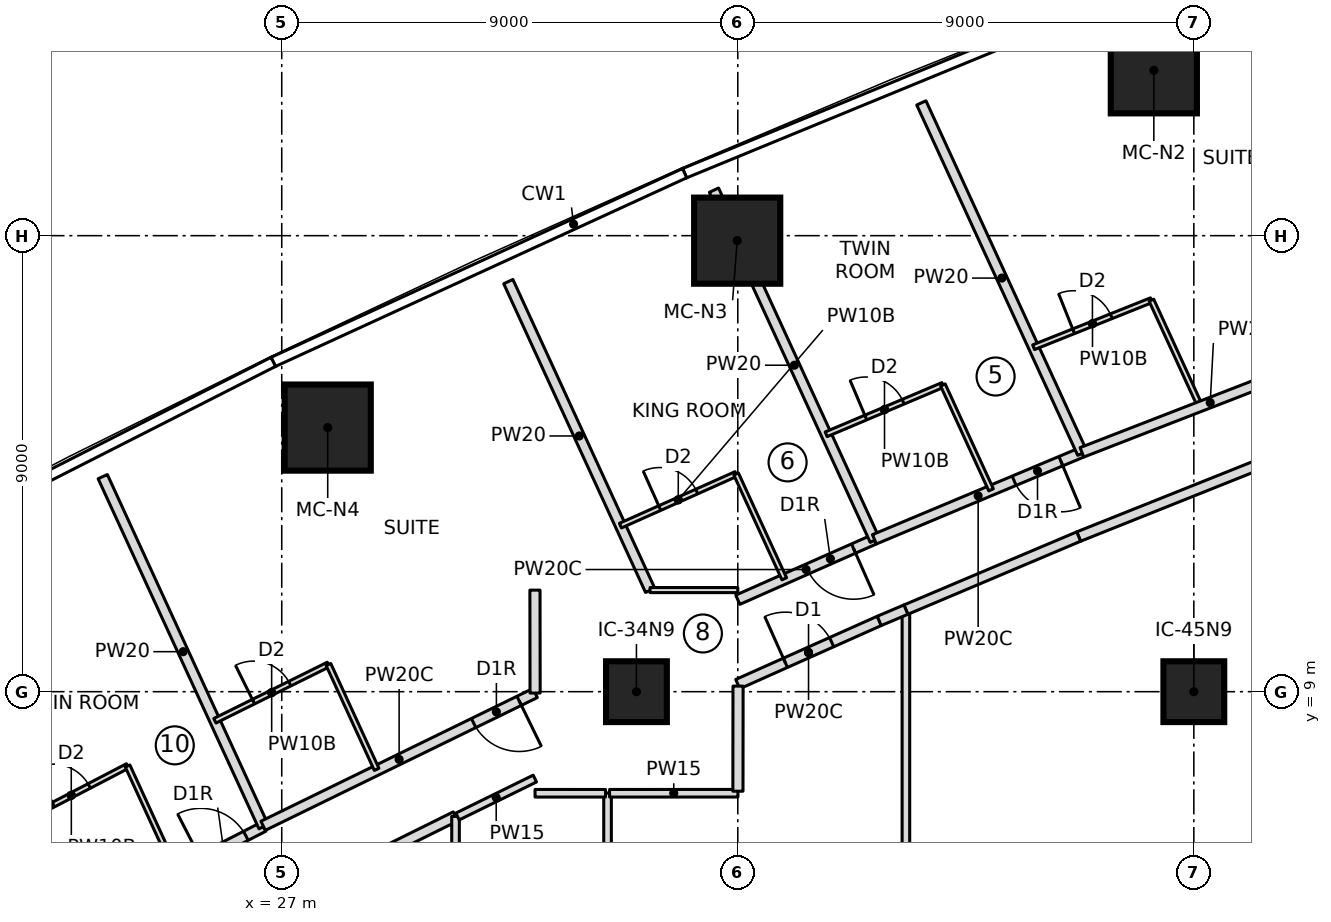
"""IFC4 building model, lengths in metres.
Left out: names, types, materials, properties, quantities, classifications, styles, units other than length and angle.
Written with IfcOpenShell. Run it as: python <this file> out.ifc"""

import sys

from ifc_helpers import new_model, si_unit, direction, frame, frame_2d, origin, origin_2d, place, context, subcontext, project, spatial, rectangle, extrude, element, fill, save


model = new_model("IFC4")
c1 = context("Model", 3, precision=1e-05, world=origin(), true_north=direction((0.0, 1.0)))
c2 = subcontext(c1, "Body", "Model", "MODEL_VIEW")
j1 = project(units=[si_unit("LENGTHUNIT", "METRE"), si_unit("PLANEANGLEUNIT", "RADIAN")], contexts=[c1])
p1 = place(None, origin())
s1 = spatial("IfcSite", under=j1, at=p1, CompositionType="ELEMENT")
p2 = place(p1, origin())
s2 = spatial("IfcBuilding", under=s1, at=p2, CompositionType="ELEMENT")
p3 = place(p2, frame((0.0, 0.0, 84.9)))
s3 = spatial("IfcBuildingStorey", under=s2, at=p3, CompositionType="ELEMENT", Elevation=84.9)
for number, where, z_axis, x_axis in (
    (1, (44.211, 21.264, 0.0), (0.0, 0.0, 1.0), (1.0, 0.0, 0.0)),
    (2, (35.988, 17.902, 0.0), (0.0, 0.0, 1.0), (1.0, 0.0, 0.0)),
    (3, (27.907, 14.212, 0.0), (0.0, 0.0, 1.0), (1.0, 0.0, 0.0)),
):
    element("IfcColumn", number, at=place(p3, frame(where, z_axis=z_axis, x_axis=x_axis)), inside=s3, PredefinedType="COLUMN", context=c2, shape_type="SweptSolid", body=[
        extrude(rectangle(XDim=1.7, YDim=1.7, at=origin_2d()), origin(), (0.0, 0.0, 1.0), 3.55),
    ])
for number, where, z_axis, x_axis in (
    (4, (34.0, 9.0, 0.0), (0.0, 0.0, 1.0), (1.0, 0.0, 0.0)),
    (5, (45.0, 9.0, 0.0), (0.0, 0.0, 1.0), (1.0, 0.0, 0.0)),
):
    element("IfcColumn", number, at=place(p3, frame(where, z_axis=z_axis, x_axis=x_axis)), inside=s3, PredefinedType="COLUMN", context=c2, shape_type="SweptSolid", body=[
        extrude(rectangle(XDim=1.2, YDim=1.2, at=origin_2d()), origin(), (0.0, 0.0, 1.0), 3.55),
    ])
p4 = place(p3, frame((22.699, 4.284, 0.0), z_axis=(0.0, 0.0, 1.0), x_axis=(-0.417413534969, 0.908716644959, 0.0)))
e6 = element("IfcWall", 6, at=p4, inside=s3, PredefinedType="PARTITIONING", context=c2, shape_type="SweptSolid", body=[
    extrude(rectangle(XDim=7.609, YDim=0.2, at=frame_2d((3.805, 0.0))), origin(), (0.0, 0.0, 1.0), 3.25),
])
p5 = place(p3, frame((22.69, 4.302, 0.0), z_axis=(0.0, 0.0, 1.0), x_axis=(0.889236075961, 0.457448577667, 0.0)))
e7 = element("IfcWall", 7, at=p5, inside=s3, PredefinedType="PARTITIONING", context=c2, shape_type="SweptSolid", body=[
    extrude(rectangle(XDim=4.443, YDim=0.2, at=frame_2d((2.222, 0.0))), origin(), (0.0, 0.0, 1.0), 3.25),
])
p6 = place(p5, frame((3.05, 0.0, 0.0)))
e8 = element("IfcOpeningElement", 8, at=p6, cuts=e7, PredefinedType="OPENING", context=c2, shape_type="SweptSolid", body=[
    extrude(rectangle(XDim=1.0, YDim=2.1, at=frame_2d((0.5, 1.05))), frame((0.0, 0.11, 0.0), z_axis=(0.0, -1.0, 0.0), x_axis=(1.0, 0.0, 0.0)), (0.0, 0.0, 1.0), 0.22),
])
p7 = place(p3, frame((21.738, 6.377, 0.0), z_axis=(0.0, 0.0, 1.0), x_axis=(0.886911586599, 0.461939214135, 0.0)))
e9 = element("IfcWall", 9, at=p7, inside=s3, PredefinedType="PARTITIONING", context=c2, shape_type="SweptSolid", body=[
    extrude(rectangle(XDim=2.503, YDim=0.1, at=frame_2d((1.251, 0.0))), origin(), (0.0, 0.0, 1.0), 3.25),
])
p8 = place(p7, frame((0.85, 0.0, 0.0)))
e10 = element("IfcOpeningElement", 10, at=p8, cuts=e9, PredefinedType="OPENING", context=c2, shape_type="SweptSolid", body=[
    extrude(rectangle(XDim=0.8, YDim=2.1, at=frame_2d((0.4, 1.05))), frame((0.0, 0.06, 0.0), z_axis=(0.0, -1.0, 0.0), x_axis=(1.0, 0.0, 0.0)), (0.0, 0.0, 1.0), 0.12),
])
p9 = place(p3, frame((23.958, 7.533, 0.0), z_axis=(0.0, 0.0, 1.0), x_axis=(0.417454762401, -0.908697706253, 0.0)))
e11 = element("IfcWall", 11, at=p9, inside=s3, PredefinedType="PARTITIONING", context=c2, shape_type="SweptSolid", body=[
    extrude(rectangle(XDim=2.28, YDim=0.1, at=frame_2d((1.14, 0.0))), origin(), (0.0, 0.0, 1.0), 3.25),
])
p10 = place(p3, frame((26.641, 6.335, 0.0), z_axis=(0.0, 0.0, 1.0), x_axis=(-0.417455028008, 0.908697584233, 0.0)))
e12 = element("IfcWall", 12, at=p10, inside=s3, PredefinedType="PARTITIONING", context=c2, shape_type="SweptSolid", body=[
    extrude(rectangle(XDim=7.603, YDim=0.2, at=frame_2d((3.802, 0.0))), origin(), (0.0, 0.0, 1.0), 3.25),
])
p11 = place(p3, frame((32.0, 8.973, 0.0), z_axis=(0.0, 0.0, 1.0), x_axis=(-0.898654091263, -0.438657980956, 0.0)))
e13 = element("IfcWall", 13, at=p11, inside=s3, PredefinedType="PARTITIONING", context=c2, shape_type="SweptSolid", body=[
    extrude(rectangle(XDim=5.972, YDim=0.2, at=frame_2d((2.986, 0.0))), origin(), (0.0, 0.0, 1.0), 3.25),
])
p12 = place(p11, frame((0.35, 0.0, 0.0)))
e14 = element("IfcOpeningElement", 14, at=p12, cuts=e13, PredefinedType="OPENING", context=c2, shape_type="SweptSolid", body=[
    extrude(rectangle(XDim=1.0, YDim=2.1, at=frame_2d((0.5, 1.05))), frame((0.0, 0.11, 0.0), z_axis=(0.0, -1.0, 0.0), x_axis=(1.0, 0.0, 0.0)), (0.0, 0.0, 1.0), 0.22),
])
p13 = place(p3, frame((25.681, 8.426, 0.0), z_axis=(0.0, 0.0, 1.0), x_axis=(0.895944857815, 0.444165297784, 0.0)))
e15 = element("IfcWall", 15, at=p13, inside=s3, PredefinedType="PARTITIONING", context=c2, shape_type="SweptSolid", body=[
    extrude(rectangle(XDim=2.501, YDim=0.1, at=frame_2d((1.25, 0.0))), origin(), (0.0, 0.0, 1.0), 3.25),
])
p14 = place(p13, frame((0.85, 0.0, 0.0)))
e16 = element("IfcOpeningElement", 16, at=p14, cuts=e15, PredefinedType="OPENING", context=c2, shape_type="SweptSolid", body=[
    extrude(rectangle(XDim=0.8, YDim=2.1, at=frame_2d((0.4, 1.05))), frame((0.0, 0.06, 0.0), z_axis=(0.0, -1.0, 0.0), x_axis=(1.0, 0.0, 0.0)), (0.0, 0.0, 1.0), 0.12),
])
p15 = place(p3, frame((27.922, 9.537, 0.0), z_axis=(0.0, 0.0, 1.0), x_axis=(0.417433204355, -0.908707609686, 0.0)))
e17 = element("IfcWall", 17, at=p15, inside=s3, PredefinedType="PARTITIONING", context=c2, shape_type="SweptSolid", body=[
    extrude(rectangle(XDim=2.278, YDim=0.1, at=frame_2d((1.139, 0.0))), origin(), (0.0, 0.0, 1.0), 3.25),
])
p16 = place(p3, frame((34.271, 11.0, 0.0), z_axis=(0.0, 0.0, 1.0), x_axis=(-0.417420546123, 0.908713424394, 0.0)))
e18 = element("IfcWall", 18, at=p16, inside=s3, PredefinedType="PARTITIONING", context=c2, shape_type="SweptSolid", body=[
    extrude(rectangle(XDim=6.706, YDim=0.2, at=frame_2d((3.353, 0.0))), origin(), (0.0, 0.0, 1.0), 3.25),
])
p17 = place(p3, frame((38.696, 12.007, 0.0), z_axis=(0.0, 0.0, 1.0), x_axis=(-0.914578343518, -0.404408770389, 0.0)))
e19 = element("IfcWall", 19, at=p17, inside=s3, PredefinedType="PARTITIONING", context=c2, shape_type="SweptSolid", body=[
    extrude(rectangle(XDim=2.948, YDim=0.2, at=frame_2d((1.474, 0.0))), origin(), (0.0, 0.0, 1.0), 3.25),
])
p18 = place(p17, frame((0.45, 0.0, 0.0)))
e20 = element("IfcOpeningElement", 20, at=p18, cuts=e19, PredefinedType="OPENING", context=c2, shape_type="SweptSolid", body=[
    extrude(rectangle(XDim=1.0, YDim=2.1, at=frame_2d((0.5, 1.05))), frame((0.0, 0.11, 0.0), z_axis=(0.0, -1.0, 0.0), x_axis=(1.0, 0.0, 0.0)), (0.0, 0.0, 1.0), 0.22),
])
p19 = place(p3, frame((33.684, 12.277, 0.0), z_axis=(0.0, 0.0, 1.0), x_axis=(0.913016449487, 0.407922741417, 0.0)))
e21 = element("IfcWall", 21, at=p19, inside=s3, PredefinedType="PARTITIONING", context=c2, shape_type="SweptSolid", body=[
    extrude(rectangle(XDim=2.5, YDim=0.1, at=frame_2d((1.25, 0.0))), origin(), (0.0, 0.0, 1.0), 3.25),
])
p20 = place(p19, frame((0.85, 0.0, 0.0)))
e22 = element("IfcOpeningElement", 22, at=p20, cuts=e21, PredefinedType="OPENING", context=c2, shape_type="SweptSolid", body=[
    extrude(rectangle(XDim=0.8, YDim=2.1, at=frame_2d((0.4, 1.05))), frame((0.0, 0.06, 0.0), z_axis=(0.0, -1.0, 0.0), x_axis=(1.0, 0.0, 0.0)), (0.0, 0.0, 1.0), 0.12),
])
p21 = place(p3, frame((35.967, 13.297, 0.0), z_axis=(0.0, 0.0, 1.0), x_axis=(0.417378147321, -0.908732899228, 0.0)))
e23 = element("IfcWall", 23, at=p21, inside=s3, PredefinedType="PARTITIONING", context=c2, shape_type="SweptSolid", body=[
    extrude(rectangle(XDim=2.277, YDim=0.1, at=frame_2d((1.139, 0.0))), origin(), (0.0, 0.0, 1.0), 3.25),
])
p22 = place(p3, frame((38.704, 11.989, 0.0), z_axis=(0.0, 0.0, 1.0), x_axis=(-0.417416334044, 0.908715359215, 0.0)))
e24 = element("IfcWall", 24, at=p22, inside=s3, PredefinedType="PARTITIONING", context=c2, shape_type="SweptSolid", body=[
    extrude(rectangle(XDim=7.604, YDim=0.2, at=frame_2d((3.802, 0.0))), origin(), (0.0, 0.0, 1.0), 3.25),
])
p23 = place(p3, frame((42.791, 13.724, 0.0), z_axis=(0.0, 0.0, 1.0), x_axis=(-0.922230433067, -0.386640696675, 0.0)))
e25 = element("IfcWall", 25, at=p23, inside=s3, PredefinedType="PARTITIONING", context=c2, shape_type="SweptSolid", body=[
    extrude(rectangle(XDim=4.44, YDim=0.2, at=frame_2d((2.22, 0.0))), origin(), (0.0, 0.0, 1.0), 3.25),
])
p24 = place(p23, frame((0.45, 0.0, 0.0)))
e26 = element("IfcOpeningElement", 26, at=p24, cuts=e25, PredefinedType="OPENING", context=c2, shape_type="SweptSolid", body=[
    extrude(rectangle(XDim=1.0, YDim=2.1, at=frame_2d((0.5, 1.05))), frame((0.0, 0.11, 0.0), z_axis=(0.0, -1.0, 0.0), x_axis=(1.0, 0.0, 0.0)), (0.0, 0.0, 1.0), 0.22),
])
p25 = place(p3, frame((37.744, 14.08, 0.0), z_axis=(0.0, 0.0, 1.0), x_axis=(0.921042675983, 0.38946166566, 0.0)))
e27 = element("IfcWall", 27, at=p25, inside=s3, PredefinedType="PARTITIONING", context=c2, shape_type="SweptSolid", body=[
    extrude(rectangle(XDim=2.501, YDim=0.1, at=frame_2d((1.25, 0.0))), origin(), (0.0, 0.0, 1.0), 3.25),
])
p26 = place(p25, frame((0.85, 0.0, 0.0)))
e28 = element("IfcOpeningElement", 28, at=p26, cuts=e27, PredefinedType="OPENING", context=c2, shape_type="SweptSolid", body=[
    extrude(rectangle(XDim=0.8, YDim=2.1, at=frame_2d((0.4, 1.05))), frame((0.0, 0.06, 0.0), z_axis=(0.0, -1.0, 0.0), x_axis=(1.0, 0.0, 0.0)), (0.0, 0.0, 1.0), 0.12),
])
p27 = place(p3, frame((40.048, 15.054, 0.0), z_axis=(0.0, 0.0, 1.0), x_axis=(0.417433204355, -0.908707609686, 0.0)))
e29 = element("IfcWall", 29, at=p27, inside=s3, PredefinedType="PARTITIONING", context=c2, shape_type="SweptSolid", body=[
    extrude(rectangle(XDim=2.278, YDim=0.1, at=frame_2d((1.139, 0.0))), origin(), (0.0, 0.0, 1.0), 3.25),
])
p28 = place(p3, frame((42.799, 13.705, 0.0), z_axis=(0.0, 0.0, 1.0), x_axis=(-0.417427858403, 0.908710065438, 0.0)))
e30 = element("IfcWall", 30, at=p28, inside=s3, PredefinedType="PARTITIONING", context=c2, shape_type="SweptSolid", body=[
    extrude(rectangle(XDim=7.61, YDim=0.2, at=frame_2d((3.805, 0.0))), origin(), (0.0, 0.0, 1.0), 3.25),
])
p29 = place(p3, frame((41.838, 15.798, 0.0), z_axis=(0.0, 0.0, 1.0), x_axis=(0.928638024739, 0.370987087388, 0.0)))
e31 = element("IfcWall", 31, at=p29, inside=s3, PredefinedType="PARTITIONING", context=c2, shape_type="SweptSolid", body=[
    extrude(rectangle(XDim=2.503, YDim=0.1, at=frame_2d((1.252, 0.0))), origin(), (0.0, 0.0, 1.0), 3.25),
])
p30 = place(p29, frame((0.85, 0.0, 0.0)))
e32 = element("IfcOpeningElement", 32, at=p30, cuts=e31, PredefinedType="OPENING", context=c2, shape_type="SweptSolid", body=[
    extrude(rectangle(XDim=0.8, YDim=2.1, at=frame_2d((0.4, 1.05))), frame((0.0, 0.06, 0.0), z_axis=(0.0, -1.0, 0.0), x_axis=(1.0, 0.0, 0.0)), (0.0, 0.0, 1.0), 0.12),
])
p31 = place(p3, frame((44.163, 16.727, 0.0), z_axis=(0.0, 0.0, 1.0), x_axis=(0.417373525971, -0.908735021785, 0.0)))
e33 = element("IfcWall", 33, at=p31, inside=s3, PredefinedType="PARTITIONING", context=c2, shape_type="SweptSolid", body=[
    extrude(rectangle(XDim=2.28, YDim=0.1, at=frame_2d((1.14, 0.0))), origin(), (0.0, 0.0, 1.0), 3.25),
])
p32 = place(p3, frame((27.196, 4.936, 0.0), z_axis=(0.0, 0.0, 1.0), x_axis=(0.895964304417, 0.44412606905, 0.0)))
e34 = element("IfcWall", 34, at=p32, inside=s3, PredefinedType="PARTITIONING", context=c2, shape_type="SweptSolid", body=[
    extrude(rectangle(XDim=3.609, YDim=0.2, at=frame_2d((1.804, 0.0))), origin(), (0.0, 0.0, 1.0), 3.25),
])
p33 = place(p3, frame((30.43, -6.539, 0.0), z_axis=(0.0, 0.0, 1.0), x_axis=(0.0, 1.0, 0.0)))
e35 = element("IfcWall", 35, at=p33, inside=s3, PredefinedType="PARTITIONING", context=c2, shape_type="SweptSolid", body=[
    extrude(rectangle(XDim=13.077, YDim=0.15, at=frame_2d((6.539, 0.0))), origin(), (0.0, 0.0, 1.0), 3.25),
])
p34 = place(p3, frame((33.43, -7.0, 0.0), z_axis=(0.0, 0.0, 1.0), x_axis=(0.0, 1.0, 0.0)))
e36 = element("IfcWall", 36, at=p34, inside=s3, PredefinedType="PARTITIONING", context=c2, shape_type="SweptSolid", body=[
    extrude(rectangle(XDim=14.0, YDim=0.15, at=frame_2d((7.0, 0.0))), origin(), (0.0, 0.0, 1.0), 3.25),
])
p35 = place(p3, frame((36.0, 9.15, 0.0), z_axis=(0.0, 0.0, 1.0), x_axis=(0.913029587861, 0.407893333716, 0.0)))
e37 = element("IfcWall", 37, at=p35, inside=s3, PredefinedType="PARTITIONING", context=c2, shape_type="SweptSolid", body=[
    extrude(rectangle(XDim=3.058, YDim=0.2, at=frame_2d((1.529, 0.0))), origin(), (0.0, 0.0, 1.0), 3.25),
])
p36 = place(p35, frame((1.029, 0.0, 0.0)))
e38 = element("IfcOpeningElement", 38, at=p36, cuts=e37, PredefinedType="OPENING", context=c2, shape_type="SweptSolid", body=[
    extrude(rectangle(XDim=1.0, YDim=2.1, at=frame_2d((0.5, 1.05))), frame((0.0, 0.11, 0.0), z_axis=(0.0, -1.0, 0.0), x_axis=(1.0, 0.0, 0.0)), (0.0, 0.0, 1.0), 0.22),
])
p37 = place(p3, frame((39.318, -10.619, 0.0), z_axis=(0.0, 0.0, 1.0), x_axis=(0.0, 1.0, 0.0)))
e39 = element("IfcWall", 39, at=p37, inside=s3, PredefinedType="PARTITIONING", context=c2, shape_type="SweptSolid", body=[
    extrude(rectangle(XDim=21.239, YDim=0.15, at=frame_2d((10.619, 0.0))), origin(), (0.0, 0.0, 1.0), 3.25),
])
p38 = place(p3, frame((42.728, 12.062, 0.0), z_axis=(0.0, 0.0, 1.0), x_axis=(0.928638161177, 0.370986745864, 0.0)))
e40 = element("IfcWall", 40, at=p38, inside=s3, PredefinedType="PARTITIONING", context=c2, shape_type="SweptSolid", body=[
    extrude(rectangle(XDim=4.273, YDim=0.2, at=frame_2d((2.136, 0.0))), origin(), (0.0, 0.0, 1.0), 3.25),
])
p39 = place(p3, frame((39.318, 10.619, 0.0), z_axis=(0.0, 0.0, 1.0), x_axis=(0.92101730011, 0.389521671923, 0.0)))
e41 = element("IfcWall", 41, at=p39, inside=s3, PredefinedType="PARTITIONING", context=c2, shape_type="SweptSolid", body=[
    extrude(rectangle(XDim=3.702, YDim=0.2, at=frame_2d((1.851, 0.0))), origin(), (0.0, 0.0, 1.0), 3.25),
])
p40 = place(p3, frame((36.0, 11.005, 0.0), z_axis=(0.0, 0.0, 1.0), x_axis=(-1.0, 0.0, 0.0)))
e42 = element("IfcWall", 42, at=p40, inside=s3, PredefinedType="PARTITIONING", context=c2, shape_type="SweptSolid", body=[
    extrude(rectangle(XDim=1.732, YDim=0.1, at=frame_2d((0.866, 0.0))), origin(), (0.0, 0.0, 1.0), 3.25),
])
p41 = place(p3, frame((47.855, 15.687, 0.0), z_axis=(0.0, 0.0, 1.0), x_axis=(-0.932373677254, -0.361495955668, 0.0)))
e43 = element("IfcWall", 43, at=p41, inside=s3, PredefinedType="PARTITIONING", context=c2, shape_type="SweptSolid", body=[
    extrude(rectangle(XDim=5.431, YDim=0.2, at=frame_2d((2.716, 0.0))), origin(), (0.0, 0.0, 1.0), 3.25),
])
p42 = place(p3, frame((30.47, 6.536, 0.0), z_axis=(0.0, 0.0, 1.0), x_axis=(0.897735805555, 0.440534247732, 0.0)))
e44 = element("IfcWall", 44, at=p42, inside=s3, PredefinedType="PARTITIONING", context=c2, shape_type="SweptSolid", body=[
    extrude(rectangle(XDim=1.699, YDim=0.15, at=frame_2d((0.85, 0.0))), origin(), (0.0, 0.0, 1.0), 3.25),
])
p43 = place(p3, frame((31.999, 6.995, 0.0), z_axis=(0.0, 0.0, 1.0), x_axis=(1.0, 0.0, 0.0)))
e45 = element("IfcWall", 45, at=p43, inside=s3, PredefinedType="PARTITIONING", context=c2, shape_type="SweptSolid", body=[
    extrude(rectangle(XDim=1.391, YDim=0.15, at=frame_2d((0.695, 0.0))), origin(), (0.0, 0.0, 1.0), 3.25),
])
p44 = place(p3, frame((33.47, 6.995, 0.0), z_axis=(0.0, 0.0, 1.0), x_axis=(0.999999958194, 0.000289156614, 0.0)))
e46 = element("IfcWall", 46, at=p44, inside=s3, PredefinedType="PARTITIONING", context=c2, shape_type="SweptSolid", body=[
    extrude(rectangle(XDim=2.533, YDim=0.15, at=frame_2d((1.267, 0.0))), origin(), (0.0, 0.0, 1.0), 3.25),
])
p45 = place(p3, frame((36.003, 7.036, 0.0), z_axis=(0.0, 0.0, 1.0), x_axis=(0.00105932144, 0.999999438919, 0.0)))
e47 = element("IfcWall", 47, at=p45, inside=s3, PredefinedType="PARTITIONING", context=c2, shape_type="SweptSolid", body=[
    extrude(rectangle(XDim=2.074, YDim=0.2, at=frame_2d((1.037, 0.0))), origin(), (0.0, 0.0, 1.0), 3.25),
])
p46 = place(p3, frame((31.997, 11.004, 0.0), z_axis=(0.0, 0.0, 1.0), x_axis=(0.001322114229, -0.999999126007, 0.0)))
e48 = element("IfcWall", 48, at=p46, inside=s3, PredefinedType="PARTITIONING", context=c2, shape_type="SweptSolid", body=[
    extrude(rectangle(XDim=2.031, YDim=0.2, at=frame_2d((1.016, 0.0))), origin(), (0.0, 0.0, 1.0), 3.25),
])
p47 = place(p3, frame((38.792, 10.397, 0.0), z_axis=(0.0, 0.0, 1.0), x_axis=(0.921167809953, 0.389165602162, 0.0)))
e49 = element("IfcWall", 49, at=p47, inside=s3, PredefinedType="PARTITIONING", context=c2, shape_type="SweptSolid", body=[
    extrude(rectangle(XDim=0.571, YDim=0.2, at=frame_2d((0.285, 0.0))), origin(), (0.0, 0.0, 1.0), 3.25),
])
p48 = place(p8, origin())
e50 = element("IfcDoor", 50, at=p48, inside=s3, OperationType="SINGLE_SWING_LEFT", PredefinedType="DOOR", context=c2, shape_type="SweptSolid", body=[
    extrude(rectangle(XDim=0.8, YDim=2.1, at=frame_2d((0.4, 1.05))), frame((0.0, 0.025, 0.0), z_axis=(0.0, -1.0, 0.0), x_axis=(1.0, 0.0, 0.0)), (0.0, 0.0, 1.0), 0.05),
])
fill(e10, e50)
p49 = place(p6, origin())
e51 = element("IfcDoor", 51, at=p49, inside=s3, OperationType="SINGLE_SWING_RIGHT", PredefinedType="DOOR", context=c2, shape_type="SweptSolid", body=[
    extrude(rectangle(XDim=1.0, YDim=2.1, at=frame_2d((0.5, 1.05))), frame((0.0, 0.025, 0.0), z_axis=(0.0, -1.0, 0.0), x_axis=(1.0, 0.0, 0.0)), (0.0, 0.0, 1.0), 0.05),
])
fill(e8, e51)
p50 = place(p14, origin())
e52 = element("IfcDoor", 52, at=p50, inside=s3, OperationType="SINGLE_SWING_LEFT", PredefinedType="DOOR", context=c2, shape_type="SweptSolid", body=[
    extrude(rectangle(XDim=0.8, YDim=2.1, at=frame_2d((0.4, 1.05))), frame((0.0, 0.025, 0.0), z_axis=(0.0, -1.0, 0.0), x_axis=(1.0, 0.0, 0.0)), (0.0, 0.0, 1.0), 0.05),
])
fill(e16, e52)
p51 = place(p12, origin())
e53 = element("IfcDoor", 53, at=p51, inside=s3, OperationType="SINGLE_SWING_RIGHT", PredefinedType="DOOR", context=c2, shape_type="SweptSolid", body=[
    extrude(rectangle(XDim=1.0, YDim=2.1, at=frame_2d((0.5, 1.05))), frame((0.0, 0.025, 0.0), z_axis=(0.0, -1.0, 0.0), x_axis=(1.0, 0.0, 0.0)), (0.0, 0.0, 1.0), 0.05),
])
fill(e14, e53)
p52 = place(p20, origin())
e54 = element("IfcDoor", 54, at=p52, inside=s3, OperationType="SINGLE_SWING_LEFT", PredefinedType="DOOR", context=c2, shape_type="SweptSolid", body=[
    extrude(rectangle(XDim=0.8, YDim=2.1, at=frame_2d((0.4, 1.05))), frame((0.0, 0.025, 0.0), z_axis=(0.0, -1.0, 0.0), x_axis=(1.0, 0.0, 0.0)), (0.0, 0.0, 1.0), 0.05),
])
fill(e22, e54)
p53 = place(p18, origin())
e55 = element("IfcDoor", 55, at=p53, inside=s3, OperationType="SINGLE_SWING_RIGHT", PredefinedType="DOOR", context=c2, shape_type="SweptSolid", body=[
    extrude(rectangle(XDim=1.0, YDim=2.1, at=frame_2d((0.5, 1.05))), frame((0.0, 0.025, 0.0), z_axis=(0.0, -1.0, 0.0), x_axis=(1.0, 0.0, 0.0)), (0.0, 0.0, 1.0), 0.05),
])
fill(e20, e55)
p54 = place(p26, origin())
e56 = element("IfcDoor", 56, at=p54, inside=s3, OperationType="SINGLE_SWING_LEFT", PredefinedType="DOOR", context=c2, shape_type="SweptSolid", body=[
    extrude(rectangle(XDim=0.8, YDim=2.1, at=frame_2d((0.4, 1.05))), frame((0.0, 0.025, 0.0), z_axis=(0.0, -1.0, 0.0), x_axis=(1.0, 0.0, 0.0)), (0.0, 0.0, 1.0), 0.05),
])
fill(e28, e56)
p55 = place(p24, origin())
e57 = element("IfcDoor", 57, at=p55, inside=s3, OperationType="SINGLE_SWING_RIGHT", PredefinedType="DOOR", context=c2, shape_type="SweptSolid", body=[
    extrude(rectangle(XDim=1.0, YDim=2.1, at=frame_2d((0.5, 1.05))), frame((0.0, 0.025, 0.0), z_axis=(0.0, -1.0, 0.0), x_axis=(1.0, 0.0, 0.0)), (0.0, 0.0, 1.0), 0.05),
])
fill(e26, e57)
p56 = place(p30, origin())
e58 = element("IfcDoor", 58, at=p56, inside=s3, OperationType="SINGLE_SWING_LEFT", PredefinedType="DOOR", context=c2, shape_type="SweptSolid", body=[
    extrude(rectangle(XDim=0.8, YDim=2.1, at=frame_2d((0.4, 1.05))), frame((0.0, 0.025, 0.0), z_axis=(0.0, -1.0, 0.0), x_axis=(1.0, 0.0, 0.0)), (0.0, 0.0, 1.0), 0.05),
])
fill(e32, e58)
p57 = place(p36, origin())
e59 = element("IfcDoor", 59, at=p57, inside=s3, OperationType="SINGLE_SWING_LEFT", PredefinedType="DOOR", context=c2, shape_type="SweptSolid", body=[
    extrude(rectangle(XDim=1.0, YDim=2.1, at=frame_2d((0.5, 1.05))), frame((0.0, 0.025, 0.0), z_axis=(0.0, -1.0, 0.0), x_axis=(1.0, 0.0, 0.0)), (0.0, 0.0, 1.0), 0.05),
])
fill(e38, e59)
save(model, sys.argv[1])
